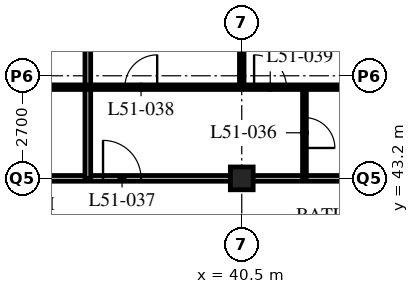
"""IFC4 building model, lengths in metres.
Left out: names, types, materials, properties, quantities, classifications, styles, units other than length and angle.
Written with IfcOpenShell. Run it as: python <this file> out.ifc"""

import sys

from ifc_helpers import new_model, si_unit, direction, frame, frame_2d, origin, origin_2d, place, context, subcontext, project, spatial, rectangle, hollow_rectangle, extrude, element, fill, save


model = new_model("IFC4")
c1 = context("Model", 3, precision=1e-05, world=origin(), true_north=direction((0.0, 1.0)))
c2 = subcontext(c1, "Body", "Model", "MODEL_VIEW")
j1 = project(units=[si_unit("LENGTHUNIT", "METRE"), si_unit("PLANEANGLEUNIT", "RADIAN")], contexts=[c1])
p1 = place(None, origin())
s1 = spatial("IfcSite", under=j1, at=p1, CompositionType="ELEMENT")
p2 = place(p1, origin())
s2 = spatial("IfcBuilding", under=s1, at=p2, CompositionType="ELEMENT")
p3 = place(p2, frame((0.0, 0.0, 199.2)))
s3 = spatial("IfcBuildingStorey", under=s2, at=p3, CompositionType="ELEMENT", Elevation=199.2)
p4 = place(p3, frame((40.5, 43.2, 0.0), z_axis=(0.0, 0.0, 1.0), x_axis=(1.0, 0.0, 0.0)))
e1 = element("IfcColumn", 1, at=p4, inside=s3, PredefinedType="COLUMN", context=c2, shape_type="SweptSolid", body=[
    extrude(hollow_rectangle(XDim=0.6, YDim=0.6, WallThickness=0.05, at=origin_2d()), origin(), (0.0, 0.0, 1.0), 3.6),
])
p5 = place(p3, frame((8.1, 43.2, 0.0), z_axis=(0.0, 0.0, 1.0), x_axis=(1.0, 0.0, 0.0)))
e2 = element("IfcWall", 2, at=p5, inside=s3, PredefinedType="PARTITIONING", context=c2, shape_type="SweptSolid", body=[
    extrude(rectangle(XDim=40.5, YDim=0.15, at=frame_2d((20.25, 0.0))), origin(), (0.0, 0.0, 1.0), 2.778),
])
p6 = place(p5, frame((4.45, 0.0, 0.0)))
e3 = element("IfcOpeningElement", 3, at=p6, cuts=e2, PredefinedType="OPENING", context=c2, shape_type="SweptSolid", body=[
    extrude(rectangle(XDim=1.0, YDim=2.1, at=frame_2d((0.5, 1.05))), frame((0.0, 0.085, 0.0), z_axis=(0.0, -1.0, 0.0), x_axis=(1.0, 0.0, 0.0)), (0.0, 0.0, 1.0), 0.17),
])
p7 = place(p5, frame((20.65, 0.0, 0.0)))
e4 = element("IfcOpeningElement", 4, at=p7, cuts=e2, PredefinedType="OPENING", context=c2, shape_type="SweptSolid", body=[
    extrude(rectangle(XDim=1.0, YDim=2.1, at=frame_2d((0.5, 1.05))), frame((0.0, 0.085, 0.0), z_axis=(0.0, -1.0, 0.0), x_axis=(1.0, 0.0, 0.0)), (0.0, 0.0, 1.0), 0.17),
])
p8 = place(p5, frame((28.75, 0.0, 0.0)))
e5 = element("IfcOpeningElement", 5, at=p8, cuts=e2, PredefinedType="OPENING", context=c2, shape_type="SweptSolid", body=[
    extrude(rectangle(XDim=1.0, YDim=2.1, at=frame_2d((0.5, 1.05))), frame((0.0, 0.085, 0.0), z_axis=(0.0, -1.0, 0.0), x_axis=(1.0, 0.0, 0.0)), (0.0, 0.0, 1.0), 0.17),
])
p9 = place(p5, frame((37.975, 0.0, 0.0)))
e6 = element("IfcOpeningElement", 6, at=p9, cuts=e2, PredefinedType="OPENING", context=c2, shape_type="SweptSolid", body=[
    extrude(rectangle(XDim=1.0, YDim=2.1, at=frame_2d((0.5, 1.05))), frame((0.0, 0.085, 0.0), z_axis=(0.0, -1.0, 0.0), x_axis=(1.0, 0.0, 0.0)), (0.0, 0.0, 1.0), 0.17),
])
p10 = place(p5, frame((1.525, 0.0, 0.0)))
e7 = element("IfcOpeningElement", 7, at=p10, cuts=e2, PredefinedType="OPENING", context=c2, shape_type="SweptSolid", body=[
    extrude(rectangle(XDim=1.0, YDim=2.1, at=frame_2d((0.5, 1.05))), frame((0.0, 0.085, 0.0), z_axis=(0.0, -1.0, 0.0), x_axis=(1.0, 0.0, 0.0)), (0.0, 0.0, 1.0), 0.17),
])
p11 = place(p3, frame((36.45, 43.2, 0.0), z_axis=(0.0, 0.0, 1.0), x_axis=(0.0, 1.0, 0.0)))
e8 = element("IfcWall", 8, at=p11, inside=s3, PredefinedType="PARTITIONING", context=c2, shape_type="SweptSolid", body=[
    extrude(rectangle(XDim=15.9, YDim=0.15, at=frame_2d((7.95, 0.0))), origin(), (0.0, 0.0, 1.0), 3.39),
])
p12 = place(p3, frame((42.15, 43.2, 0.0), z_axis=(0.0, 0.0, 1.0), x_axis=(0.0, 1.0, 0.0)))
e9 = element("IfcWall", 9, at=p12, inside=s3, PredefinedType="PARTITIONING", context=c2, shape_type="SweptSolid", body=[
    extrude(rectangle(XDim=2.4, YDim=0.1, at=frame_2d((1.2, 0.0))), origin(), (0.0, 0.0, 1.0), 3.39),
])
p13 = place(p12, frame((0.8, 0.0, 0.0)))
e10 = element("IfcOpeningElement", 10, at=p13, cuts=e9, PredefinedType="OPENING", context=c2, shape_type="SweptSolid", body=[
    extrude(rectangle(XDim=0.8, YDim=2.1, at=frame_2d((0.4, 1.05))), frame((0.0, 0.06, 0.0), z_axis=(0.0, -1.0, 0.0), x_axis=(1.0, 0.0, 0.0)), (0.0, 0.0, 1.0), 0.12),
])
p14 = place(p3, frame((40.5, 45.6, 0.0), z_axis=(0.0, 0.0, 1.0), x_axis=(0.0, 1.0, 0.0)))
e11 = element("IfcWall", 11, at=p14, inside=s3, PredefinedType="PARTITIONING", context=c2, shape_type="SweptSolid", body=[
    extrude(rectangle(XDim=13.5, YDim=0.12, at=frame_2d((6.75, 0.0))), origin(), (0.0, 0.0, 1.0), 2.778),
])
p15 = place(p3, frame((4.1, 45.6, 0.0), z_axis=(0.0, 0.0, 1.0), x_axis=(1.0, 0.0, 0.0)))
e12 = element("IfcWall", 12, at=p15, inside=s3, PredefinedType="PARTITIONING", context=c2, shape_type="SweptSolid", body=[
    extrude(rectangle(XDim=48.5, YDim=0.12, at=frame_2d((24.25, 0.0))), origin(), (0.0, 0.0, 1.0), 3.39),
])
p16 = place(p15, frame((9.025, 0.0, 0.0)))
e13 = element("IfcOpeningElement", 13, at=p16, cuts=e12, PredefinedType="OPENING", context=c2, shape_type="SweptSolid", body=[
    extrude(rectangle(XDim=0.85, YDim=2.1, at=frame_2d((0.425, 1.05))), frame((0.0, 0.07, 0.0), z_axis=(0.0, -1.0, 0.0), x_axis=(1.0, 0.0, 0.0)), (0.0, 0.0, 1.0), 0.14),
])
p17 = place(p15, frame((16.475, 0.0, 0.0)))
e14 = element("IfcOpeningElement", 14, at=p17, cuts=e12, PredefinedType="OPENING", context=c2, shape_type="SweptSolid", body=[
    extrude(rectangle(XDim=0.85, YDim=2.1, at=frame_2d((0.425, 1.05))), frame((0.0, 0.07, 0.0), z_axis=(0.0, -1.0, 0.0), x_axis=(1.0, 0.0, 0.0)), (0.0, 0.0, 1.0), 0.14),
])
p18 = place(p15, frame((20.525, 0.0, 0.0)))
e15 = element("IfcOpeningElement", 15, at=p18, cuts=e12, PredefinedType="OPENING", context=c2, shape_type="SweptSolid", body=[
    extrude(rectangle(XDim=0.85, YDim=2.1, at=frame_2d((0.425, 1.05))), frame((0.0, 0.07, 0.0), z_axis=(0.0, -1.0, 0.0), x_axis=(1.0, 0.0, 0.0)), (0.0, 0.0, 1.0), 0.14),
])
p19 = place(p15, frame((25.225, 0.0, 0.0)))
e16 = element("IfcOpeningElement", 16, at=p19, cuts=e12, PredefinedType="OPENING", context=c2, shape_type="SweptSolid", body=[
    extrude(rectangle(XDim=0.85, YDim=2.1, at=frame_2d((0.425, 1.05))), frame((0.0, 0.07, 0.0), z_axis=(0.0, -1.0, 0.0), x_axis=(1.0, 0.0, 0.0)), (0.0, 0.0, 1.0), 0.14),
])
p20 = place(p15, frame((28.625, 0.0, 0.0)))
e17 = element("IfcOpeningElement", 17, at=p20, cuts=e12, PredefinedType="OPENING", context=c2, shape_type="SweptSolid", body=[
    extrude(rectangle(XDim=0.85, YDim=2.1, at=frame_2d((0.425, 1.05))), frame((0.0, 0.07, 0.0), z_axis=(0.0, -1.0, 0.0), x_axis=(1.0, 0.0, 0.0)), (0.0, 0.0, 1.0), 0.14),
])
p21 = place(p15, frame((33.325, 0.0, 0.0)))
e18 = element("IfcOpeningElement", 18, at=p21, cuts=e12, PredefinedType="OPENING", context=c2, shape_type="SweptSolid", body=[
    extrude(rectangle(XDim=0.85, YDim=2.1, at=frame_2d((0.425, 1.05))), frame((0.0, 0.07, 0.0), z_axis=(0.0, -1.0, 0.0), x_axis=(1.0, 0.0, 0.0)), (0.0, 0.0, 1.0), 0.14),
])
p22 = place(p15, frame((36.725, 0.0, 0.0)))
e19 = element("IfcOpeningElement", 19, at=p22, cuts=e12, PredefinedType="OPENING", context=c2, shape_type="SweptSolid", body=[
    extrude(rectangle(XDim=0.85, YDim=2.1, at=frame_2d((0.425, 1.05))), frame((0.0, 0.07, 0.0), z_axis=(0.0, -1.0, 0.0), x_axis=(1.0, 0.0, 0.0)), (0.0, 0.0, 1.0), 0.14),
])
p23 = place(p15, frame((40.925, 0.0, 0.0)))
e20 = element("IfcOpeningElement", 20, at=p23, cuts=e12, PredefinedType="OPENING", context=c2, shape_type="SweptSolid", body=[
    extrude(rectangle(XDim=0.85, YDim=2.1, at=frame_2d((0.425, 1.05))), frame((0.0, 0.07, 0.0), z_axis=(0.0, -1.0, 0.0), x_axis=(1.0, 0.0, 0.0)), (0.0, 0.0, 1.0), 0.14),
])
p24 = place(p15, frame((44.775, 0.0, 0.0)))
e21 = element("IfcOpeningElement", 21, at=p24, cuts=e12, PredefinedType="OPENING", context=c2, shape_type="SweptSolid", body=[
    extrude(rectangle(XDim=0.85, YDim=2.1, at=frame_2d((0.425, 1.05))), frame((0.0, 0.07, 0.0), z_axis=(0.0, -1.0, 0.0), x_axis=(1.0, 0.0, 0.0)), (0.0, 0.0, 1.0), 0.14),
])
p25 = place(p15, frame((6.725, 0.0, 0.0)))
e22 = element("IfcOpeningElement", 22, at=p25, cuts=e12, PredefinedType="OPENING", context=c2, shape_type="SweptSolid", body=[
    extrude(rectangle(XDim=0.85, YDim=2.1, at=frame_2d((0.425, 1.05))), frame((0.0, 0.07, 0.0), z_axis=(0.0, -1.0, 0.0), x_axis=(1.0, 0.0, 0.0)), (0.0, 0.0, 1.0), 0.14),
])
p26 = place(p15, frame((2.875, 0.0, 0.0)))
e23 = element("IfcOpeningElement", 23, at=p26, cuts=e12, PredefinedType="OPENING", context=c2, shape_type="SweptSolid", body=[
    extrude(rectangle(XDim=0.85, YDim=2.1, at=frame_2d((0.425, 1.05))), frame((0.0, 0.07, 0.0), z_axis=(0.0, -1.0, 0.0), x_axis=(1.0, 0.0, 0.0)), (0.0, 0.0, 1.0), 0.14),
])
p27 = place(p13, origin())
e24 = element("IfcDoor", 24, at=p27, inside=s3, OperationType="SINGLE_SWING_RIGHT", PredefinedType="DOOR", context=c2, shape_type="SweptSolid", body=[
    extrude(rectangle(XDim=0.8, YDim=2.1, at=frame_2d((0.4, 1.05))), frame((0.0, 0.025, 0.0), z_axis=(0.0, -1.0, 0.0), x_axis=(1.0, 0.0, 0.0)), (0.0, 0.0, 1.0), 0.05),
])
fill(e10, e24)
p28 = place(p8, origin())
e25 = element("IfcDoor", 25, at=p28, inside=s3, OperationType="SINGLE_SWING_LEFT", PredefinedType="DOOR", context=c2, shape_type="SweptSolid", body=[
    extrude(rectangle(XDim=1.0, YDim=2.1, at=frame_2d((0.5, 1.05))), frame((0.0, 0.025, 0.0), z_axis=(0.0, -1.0, 0.0), x_axis=(1.0, 0.0, 0.0)), (0.0, 0.0, 1.0), 0.05),
])
fill(e5, e25)
p29 = place(p21, origin())
e26 = element("IfcDoor", 26, at=p29, inside=s3, OperationType="SINGLE_SWING_RIGHT", PredefinedType="DOOR", context=c2, shape_type="SweptSolid", body=[
    extrude(rectangle(XDim=0.85, YDim=2.1, at=frame_2d((0.425, 1.05))), frame((0.0, 0.025, 0.0), z_axis=(0.0, -1.0, 0.0), x_axis=(1.0, 0.0, 0.0)), (0.0, 0.0, 1.0), 0.05),
])
fill(e18, e26)
p30 = place(p22, origin())
e27 = element("IfcDoor", 27, at=p30, inside=s3, OperationType="SINGLE_SWING_LEFT", PredefinedType="DOOR", context=c2, shape_type="SweptSolid", body=[
    extrude(rectangle(XDim=0.85, YDim=2.1, at=frame_2d((0.425, 1.05))), frame((0.0, 0.025, 0.0), z_axis=(0.0, -1.0, 0.0), x_axis=(1.0, 0.0, 0.0)), (0.0, 0.0, 1.0), 0.05),
])
fill(e19, e27)
save(model, sys.argv[1])
